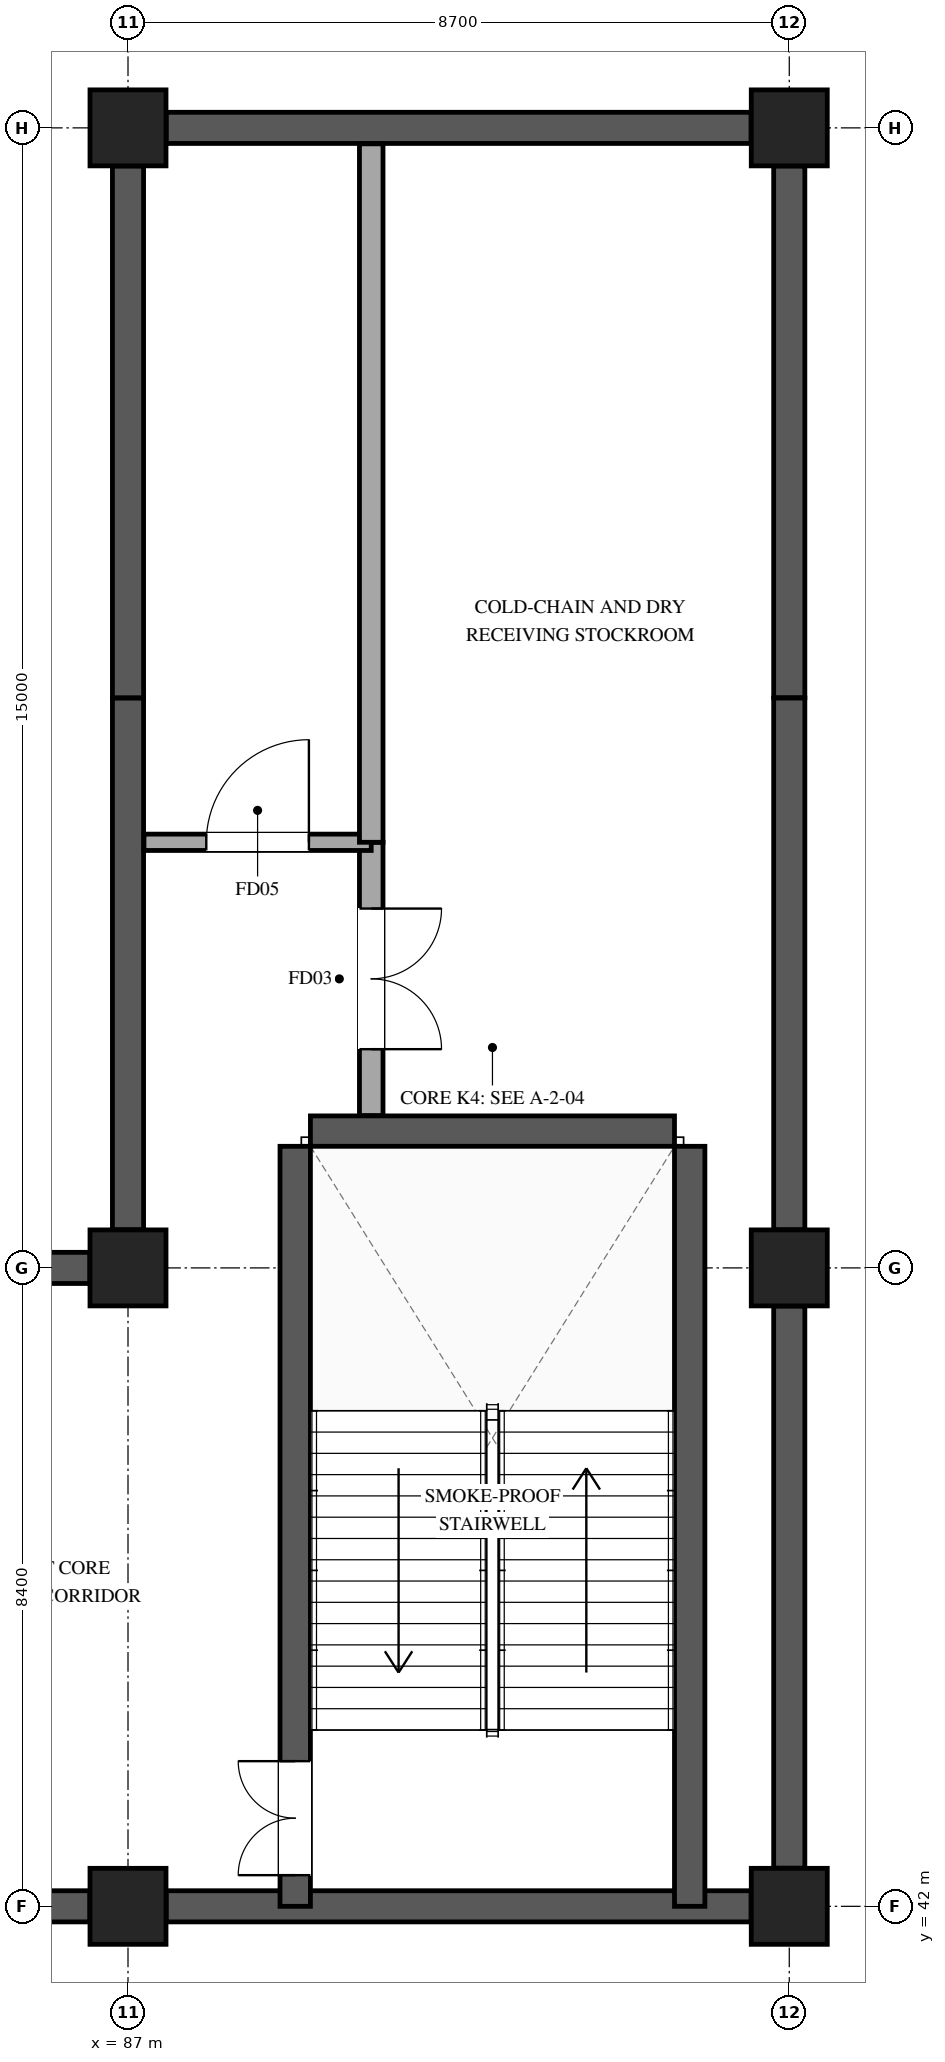
"""IFC4 building model, lengths in metres.
Left out: names, types, materials, properties, quantities, classifications, styles, units other than length and angle.
Written with IfcOpenShell. Run it as: python <this file> out.ifc"""

import sys

from ifc_helpers import new_model, si_unit, direction, frame, frame_2d, origin, origin_2d, place, context, subcontext, project, spatial, rectangle, extrude, element, fill, save


model = new_model("IFC4")
c1 = context("Model", 3, precision=1e-05, world=origin(), true_north=direction((0.0, 1.0)))
c2 = subcontext(c1, "Body", "Model", "MODEL_VIEW")
j1 = project(units=[si_unit("LENGTHUNIT", "METRE"), si_unit("PLANEANGLEUNIT", "RADIAN")], contexts=[c1])
p1 = place(None, origin())
s1 = spatial("IfcSite", under=j1, at=p1, CompositionType="ELEMENT")
p2 = place(p1, origin())
s2 = spatial("IfcBuilding", under=s1, at=p2, CompositionType="ELEMENT")
p3 = place(p2, frame((0.0, 0.0, -4.8)))
s3 = spatial("IfcBuildingStorey", under=s2, at=p3, CompositionType="ELEMENT", Elevation=-4.8)
for number, where, z_axis, x_axis in (
    (1, (87.0, 42.0, 0.0), (0.0, 0.0, 1.0), (1.0, 0.0, 0.0)),
    (2, (87.0, 50.4, 0.0), (0.0, 0.0, 1.0), (1.0, 0.0, 0.0)),
    (3, (87.0, 65.4, 0.0), (0.0, 0.0, 1.0), (1.0, 0.0, 0.0)),
    (4, (95.7, 42.0, 0.0), (0.0, 0.0, 1.0), (1.0, 0.0, 0.0)),
    (5, (95.7, 50.4, 0.0), (0.0, 0.0, 1.0), (1.0, 0.0, 0.0)),
    (6, (95.7, 65.4, 0.0), (0.0, 0.0, 1.0), (1.0, 0.0, 0.0)),
):
    element("IfcColumn", number, at=place(p3, frame(where, z_axis=z_axis, x_axis=x_axis)), inside=s3, PredefinedType="COLUMN", context=c2, shape_type="SweptSolid", body=[
        extrude(rectangle(XDim=1.0, YDim=1.0, at=origin_2d()), origin(), (0.0, 0.0, 1.0), 4.8),
    ])
p4 = place(p3, frame((78.802, 50.4, 0.0), z_axis=(0.0, 0.0, 1.0), x_axis=(1.0, 0.0, 0.0)))
e7 = element("IfcWall", 7, at=p4, inside=s3, PredefinedType="USERDEFINED", context=c2, shape_type="SweptSolid", body=[
    extrude(rectangle(XDim=7.696, YDim=0.41, at=frame_2d((3.848, 0.0))), origin(), (0.0, 0.0, 1.0), 4.46),
])
for number, where, z_axis, x_axis in (
    (8, (87.0, 50.902, 0.0), (0.0, 0.0, 1.0), (0.0, 1.0, 0.0)),
    (9, (87.0, 57.902, 0.0), (0.0, 0.0, 1.0), (0.0, 1.0, 0.0)),
):
    element("IfcWall", number, at=place(p3, frame(where, z_axis=z_axis, x_axis=x_axis)), inside=s3, PredefinedType="USERDEFINED", context=c2, shape_type="SweptSolid", body=[
        extrude(rectangle(XDim=6.996, YDim=0.41, at=frame_2d((3.498, 0.0))), origin(), (0.0, 0.0, 1.0), 4.46),
    ])
p5 = place(p3, frame((87.502, 65.4, 0.0), z_axis=(0.0, 0.0, 1.0), x_axis=(1.0, 0.0, 0.0)))
e10 = element("IfcWall", 10, at=p5, inside=s3, PredefinedType="USERDEFINED", context=c2, shape_type="SweptSolid", body=[
    extrude(rectangle(XDim=7.696, YDim=0.41, at=frame_2d((3.848, 0.0))), origin(), (0.0, 0.0, 1.0), 4.46),
])
for number, where, z_axis, x_axis in (
    (11, (95.7, 64.898, 0.0), (0.0, 0.0, 1.0), (0.0, -1.0, 0.0)),
    (12, (95.7, 57.898, 0.0), (0.0, 0.0, 1.0), (0.0, -1.0, 0.0)),
):
    element("IfcWall", number, at=place(p3, frame(where, z_axis=z_axis, x_axis=x_axis)), inside=s3, PredefinedType="USERDEFINED", context=c2, shape_type="SweptSolid", body=[
        extrude(rectangle(XDim=6.996, YDim=0.41, at=frame_2d((3.498, 0.0))), origin(), (0.0, 0.0, 1.0), 4.46),
    ])
p6 = place(p3, frame((95.7, 49.898, 0.0), z_axis=(0.0, 0.0, 1.0), x_axis=(0.0, -1.0, 0.0)))
e13 = element("IfcWall", 13, at=p6, inside=s3, PredefinedType="USERDEFINED", context=c2, shape_type="SweptSolid", body=[
    extrude(rectangle(XDim=7.396, YDim=0.41, at=frame_2d((3.698, 0.0))), origin(), (0.0, 0.0, 1.0), 4.46),
])
for number, where, z_axis, x_axis in (
    (14, (95.198, 42.0, 0.0), (0.0, 0.0, 1.0), (-1.0, 0.0, 0.0)),
    (15, (86.498, 42.0, 0.0), (0.0, 0.0, 1.0), (-1.0, 0.0, 0.0)),
):
    element("IfcWall", number, at=place(p3, frame(where, z_axis=z_axis, x_axis=x_axis)), inside=s3, PredefinedType="USERDEFINED", context=c2, shape_type="SweptSolid", body=[
        extrude(rectangle(XDim=7.696, YDim=0.41, at=frame_2d((3.848, 0.0))), origin(), (0.0, 0.0, 1.0), 4.46),
    ])
p7 = place(p3, frame((89.2, 42.0, 0.0), z_axis=(0.0, 0.0, 1.0), x_axis=(0.0, 1.0, 0.0)))
e16 = element("IfcWall", 16, at=p7, inside=s3, PredefinedType="SHEAR", context=c2, shape_type="SweptSolid", body=[
    extrude(rectangle(XDim=10.0, YDim=0.4, at=frame_2d((5.0, 0.0))), origin(), (0.0, 0.0, 1.0), 4.8),
])
p8 = place(p7, frame((0.41, 0.0, 0.0)))
e17 = element("IfcOpeningElement", 17, at=p8, cuts=e16, PredefinedType="OPENING", context=c2, shape_type="SweptSolid", body=[
    extrude(rectangle(XDim=1.5, YDim=2.2, at=frame_2d((0.75, 1.1))), frame((0.0, 0.21, 0.0), z_axis=(0.0, -1.0, 0.0), x_axis=(1.0, 0.0, 0.0)), (0.0, 0.0, 1.0), 0.42),
])
p9 = place(p3, frame((94.39, 52.0, 0.0), z_axis=(0.0, 0.0, 1.0), x_axis=(0.0, -1.0, 0.0)))
e18 = element("IfcWall", 18, at=p9, inside=s3, PredefinedType="SHEAR", context=c2, shape_type="SweptSolid", body=[
    extrude(rectangle(XDim=10.0, YDim=0.4, at=frame_2d((5.0, 0.0))), origin(), (0.0, 0.0, 1.0), 4.8),
])
p10 = place(p3, frame((89.4, 52.2, 0.0), z_axis=(0.0, 0.0, 1.0), x_axis=(1.0, 0.0, 0.0)))
e19 = element("IfcWall", 19, at=p10, inside=s3, PredefinedType="SHEAR", context=c2, shape_type="SweptSolid", body=[
    extrude(rectangle(XDim=4.79, YDim=0.4, at=frame_2d((2.395, 0.0))), origin(), (0.0, 0.0, 1.0), 4.8),
])
p11 = place(p3, frame((90.2, 56.0, 0.0), z_axis=(0.0, 0.0, 1.0), x_axis=(0.0, -1.0, 0.0)))
e20 = element("IfcWall", 20, at=p11, inside=s3, PredefinedType="STANDARD", context=c2, shape_type="SweptSolid", body=[
    extrude(rectangle(XDim=3.595, YDim=0.31, at=frame_2d((1.797, 0.0))), origin(), (0.0, 0.0, 1.0), 4.44),
])
p12 = place(p11, frame((0.872, 0.0, 0.0)))
e21 = element("IfcOpeningElement", 21, at=p12, cuts=e20, PredefinedType="OPENING", context=c2, shape_type="SweptSolid", body=[
    extrude(rectangle(XDim=1.85, YDim=2.3, at=frame_2d((0.925, 1.15))), frame((0.0, 0.165, 0.0), z_axis=(0.0, -1.0, 0.0), x_axis=(1.0, 0.0, 0.0)), (0.0, 0.0, 1.0), 0.33),
])
p13 = place(p3, frame((87.21, 56.0, 0.0), z_axis=(0.0, 0.0, 1.0), x_axis=(1.0, 0.0, 0.0)))
e22 = element("IfcWall", 22, at=p13, inside=s3, PredefinedType="PARTITIONING", context=c2, shape_type="SweptSolid", body=[
    extrude(rectangle(XDim=2.99, YDim=0.215, at=frame_2d((1.495, 0.0))), origin(), (0.0, 0.0, 1.0), 3.962),
])
p14 = place(p13, frame((0.82, 0.0, 0.0)))
e23 = element("IfcOpeningElement", 23, at=p14, cuts=e22, PredefinedType="OPENING", context=c2, shape_type="SweptSolid", body=[
    extrude(rectangle(XDim=1.35, YDim=2.2, at=frame_2d((0.675, 1.1))), frame((0.0, 0.118, 0.0), z_axis=(0.0, -1.0, 0.0), x_axis=(1.0, 0.0, 0.0)), (0.0, 0.0, 1.0), 0.235),
])
p15 = place(p3, frame((90.2, 56.0, 0.0), z_axis=(0.0, 0.0, 1.0), x_axis=(0.0, 1.0, 0.0)))
e24 = element("IfcWall", 24, at=p15, inside=s3, PredefinedType="STANDARD", context=c2, shape_type="SweptSolid", body=[
    extrude(rectangle(XDim=9.19, YDim=0.31, at=frame_2d((4.595, 0.0))), origin(), (0.0, 0.0, 1.0), 3.65),
])
p16 = place(p8, origin())
e25 = element("IfcDoor", 25, at=p16, inside=s3, OperationType="DOUBLE_DOOR_SINGLE_SWING", PredefinedType="DOOR", context=c2, shape_type="SweptSolid", body=[
    extrude(rectangle(XDim=1.5, YDim=2.2, at=frame_2d((0.75, 1.1))), frame((0.0, 0.025, 0.0), z_axis=(0.0, -1.0, 0.0), x_axis=(1.0, 0.0, 0.0)), (0.0, 0.0, 1.0), 0.05),
])
fill(e17, e25)
p17 = place(p12, origin())
e26 = element("IfcDoor", 26, at=p17, inside=s3, OperationType="DOUBLE_DOOR_SINGLE_SWING", PredefinedType="DOOR", context=c2, shape_type="SweptSolid", body=[
    extrude(rectangle(XDim=1.85, YDim=2.3, at=frame_2d((0.925, 1.15))), frame((0.0, 0.025, 0.0), z_axis=(0.0, -1.0, 0.0), x_axis=(1.0, 0.0, 0.0)), (0.0, 0.0, 1.0), 0.05),
])
fill(e21, e26)
p18 = place(p14, origin())
e27 = element("IfcDoor", 27, at=p18, inside=s3, OperationType="SINGLE_SWING_RIGHT", PredefinedType="DOOR", context=c2, shape_type="SweptSolid", body=[
    extrude(rectangle(XDim=1.35, YDim=2.2, at=frame_2d((0.675, 1.1))), frame((0.0, 0.025, 0.0), z_axis=(0.0, -1.0, 0.0), x_axis=(1.0, 0.0, 0.0)), (0.0, 0.0, 1.0), 0.05),
])
fill(e23, e27)
save(model, sys.argv[1])
